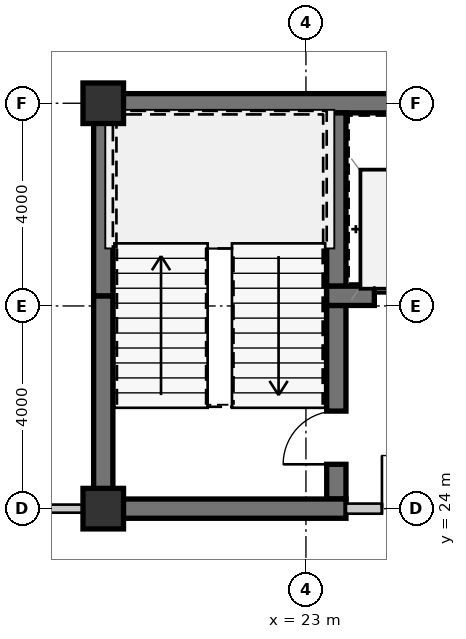
"""IFC4 building model, lengths in metres.
Left out: names, types, materials, properties, quantities, classifications, styles, units other than length and angle.
Written with IfcOpenShell. Run it as: python <this file> out.ifc"""

import sys

from ifc_helpers import new_model, si_unit, direction, frame, frame_2d, origin, origin_2d, place, context, subcontext, project, spatial, rectangle, extrude, source, transform, mapped, element, fill, save


model = new_model("IFC4")
c1 = context("Model", 3, precision=1e-05, world=origin(), true_north=direction((0.0, 1.0)))
c2 = subcontext(c1, "Body", "Model", "MODEL_VIEW")
j1 = project(units=[si_unit("LENGTHUNIT", "METRE"), si_unit("PLANEANGLEUNIT", "RADIAN")], contexts=[c1])
p1 = place(None, origin())
s1 = spatial("IfcSite", under=j1, at=p1, CompositionType="ELEMENT")
p2 = place(p1, origin())
s2 = spatial("IfcBuilding", under=s1, at=p2, CompositionType="ELEMENT")
p3 = place(p2, frame((0.0, 0.0, 19.95)))
s3 = spatial("IfcBuildingStorey", under=s2, at=p3, CompositionType="ELEMENT", Elevation=19.95)
m1 = source(origin(), c2, "Body", "SweptSolid", [
    extrude(rectangle(XDim=0.8, YDim=0.8, at=origin_2d()), origin(), (0.0, 0.0, 1.0), 3.15),
])
for number, where, z_axis, x_axis in (
    (1, (19.0, 24.0, 0.0), (0.0, 0.0, 1.0), (1.0, 0.0, 0.0)),
    (2, (19.0, 32.0, 0.0), (0.0, 0.0, 1.0), (1.0, 0.0, 0.0)),
):
    element("IfcColumn", number, at=place(p3, frame(where, z_axis=z_axis, x_axis=x_axis)), inside=s3, PredefinedType="COLUMN", context=c2, shape_type="MappedRepresentation", body=[
        mapped(m1, transform((0.0, 0.0, 0.0), scale=1.0)),
    ])
m2 = source(origin(), c2, "Body", "SweptSolid", [
    extrude(rectangle(XDim=9.19, YDim=0.38, at=frame_2d((4.595, 0.0))), origin(), (0.0, 0.0, 1.0), 2.93),
])
p4 = place(p3, frame((18.81, 32.0, 0.0), z_axis=(0.0, 0.0, 1.0), x_axis=(1.0, 0.0, 0.0)))
e3 = element("IfcWall", 3, at=p4, inside=s3, PredefinedType="SHEAR", context=c2, shape_type="MappedRepresentation", body=[
    mapped(m2, transform((0.0, 0.0, 0.0), scale=1.0)),
])
m3 = source(origin(), c2, "Body", "SweptSolid", [
    extrude(rectangle(XDim=4.01, YDim=0.38, at=frame_2d((2.005, 0.0))), origin(), (0.0, 0.0, 1.0), 2.93),
])
p5 = place(p3, frame((19.0, 24.19, 0.0), z_axis=(0.0, 0.0, 1.0), x_axis=(0.0, 1.0, 0.0)))
e4 = element("IfcWall", 4, at=p5, inside=s3, PredefinedType="SHEAR", context=c2, shape_type="MappedRepresentation", body=[
    mapped(m3, transform((0.0, 0.0, 0.0), scale=1.0)),
])
m4 = source(origin(), c2, "Body", "SweptSolid", [
    extrude(rectangle(XDim=3.61, YDim=0.38, at=frame_2d((1.805, 0.0))), origin(), (0.0, 0.0, 1.0), 2.93),
])
p6 = place(p3, frame((19.0, 28.2, 0.0), z_axis=(0.0, 0.0, 1.0), x_axis=(0.0, 1.0, 0.0)))
e5 = element("IfcWall", 5, at=p6, inside=s3, PredefinedType="SHEAR", context=c2, shape_type="MappedRepresentation", body=[
    mapped(m4, transform((0.0, 0.0, 0.0), scale=1.0)),
])
m5 = source(origin(), c2, "Body", "SweptSolid", [
    extrude(rectangle(XDim=3.42, YDim=0.38, at=frame_2d((1.71, 0.0))), origin(), (0.0, 0.0, 1.0), 2.93),
])
p7 = place(p3, frame((23.6, 28.39, 0.0), z_axis=(0.0, 0.0, 1.0), x_axis=(0.0, 1.0, 0.0)))
e6 = element("IfcWall", 6, at=p7, inside=s3, PredefinedType="SHEAR", context=c2, shape_type="MappedRepresentation", body=[
    mapped(m5, transform((0.0, 0.0, 0.0), scale=1.0)),
])
m6 = source(origin(), c2, "Body", "SweptSolid", [
    extrude(rectangle(XDim=3.82, YDim=0.38, at=frame_2d((1.91, 0.0))), origin(), (0.0, 0.0, 1.0), 2.93),
])
p8 = place(p3, frame((23.6, 24.19, 0.0), z_axis=(0.0, 0.0, 1.0), x_axis=(0.0, 1.0, 0.0)))
e7 = element("IfcWall", 7, at=p8, inside=s3, PredefinedType="SHEAR", context=c2, shape_type="MappedRepresentation", body=[
    mapped(m6, transform((0.0, 0.0, 0.0), scale=1.0)),
])
m7 = source(origin(), c2, "Body", "SweptSolid", [
    extrude(rectangle(XDim=1.05, YDim=2.1, at=frame_2d((0.525, 1.05))), frame((0.0, 0.2, 0.0), z_axis=(0.0, -1.0, 0.0), x_axis=(1.0, 0.0, 0.0)), (0.0, 0.0, 1.0), 0.4),
])
p9 = place(p8, frame((0.685, 0.0, 0.0)))
e8 = element("IfcOpeningElement", 8, at=p9, cuts=e7, PredefinedType="OPENING", context=c2, shape_type="MappedRepresentation", body=[
    mapped(m7, transform((0.0, 0.0, 0.0), scale=1.0)),
])
m8 = source(origin(), c2, "Body", "SweptSolid", [
    extrude(rectangle(XDim=4.98, YDim=0.38, at=frame_2d((2.49, 0.0))), origin(), (0.0, 0.0, 1.0), 2.93),
])
p10 = place(p3, frame((18.81, 24.0, 0.0), z_axis=(0.0, 0.0, 1.0), x_axis=(1.0, 0.0, 0.0)))
e9 = element("IfcWall", 9, at=p10, inside=s3, PredefinedType="SHEAR", context=c2, shape_type="MappedRepresentation", body=[
    mapped(m8, transform((0.0, 0.0, 0.0), scale=1.0)),
])
m9 = source(origin(), c2, "Body", "SweptSolid", [
    extrude(rectangle(XDim=2.98, YDim=0.38, at=frame_2d((1.49, 0.0))), origin(), (0.0, 0.0, 1.0), 2.93),
])
p11 = place(p3, frame((23.41, 28.2, 0.0), z_axis=(0.0, 0.0, 1.0), x_axis=(1.0, 0.0, 0.0)))
e10 = element("IfcWall", 10, at=p11, inside=s3, PredefinedType="SHEAR", context=c2, shape_type="MappedRepresentation", body=[
    mapped(m9, transform((0.0, 0.0, 0.0), scale=1.0)),
])
m10 = source(origin(), c2, "Body", "SweptSolid", [
    extrude(rectangle(XDim=1.1, YDim=2.15, at=frame_2d((0.55, 1.075))), frame((0.0, 0.2, 0.0), z_axis=(0.0, -1.0, 0.0), x_axis=(1.0, 0.0, 0.0)), (0.0, 0.0, 1.0), 0.4),
])
p12 = place(p11, frame((0.94, 0.0, 0.0)))
e11 = element("IfcOpeningElement", 11, at=p12, cuts=e10, PredefinedType="OPENING", context=c2, shape_type="MappedRepresentation", body=[
    mapped(m10, transform((0.0, 0.0, 0.0), scale=1.0)),
])
m11 = source(origin(), c2, "Body", "SweptSolid", [
    extrude(rectangle(XDim=2.66, YDim=0.2, at=frame_2d((1.33, 0.0))), origin(), (0.0, 0.0, 1.0), 2.47),
])
p13 = place(p3, frame((23.79, 24.0, 0.0), z_axis=(0.0, 0.0, 1.0), x_axis=(1.0, 0.0, 0.0)))
e12 = element("IfcWall", 12, at=p13, inside=s3, PredefinedType="SOLIDWALL", context=c2, shape_type="MappedRepresentation", body=[
    mapped(m11, transform((0.0, 0.0, 0.0), scale=1.0)),
])
m12 = source(origin(), c2, "Body", "SweptSolid", [
    extrude(rectangle(XDim=1.05, YDim=2.1, at=frame_2d((0.525, 1.05))), frame((0.0, 0.11, 0.0), z_axis=(0.0, -1.0, 0.0), x_axis=(1.0, 0.0, 0.0)), (0.0, 0.0, 1.0), 0.22),
])
p14 = place(p13, frame((0.71, 0.0, 0.0)))
e13 = element("IfcOpeningElement", 13, at=p14, cuts=e12, PredefinedType="OPENING", context=c2, shape_type="MappedRepresentation", body=[
    mapped(m12, transform((0.0, 0.0, 0.0), scale=1.0)),
])
m13 = source(origin(), c2, "Body", "SweptSolid", [
    extrude(rectangle(XDim=4.13, YDim=0.16, at=frame_2d((2.065, 0.0))), origin(), (0.0, 0.0, 1.0), 2.93),
])
p15 = place(p3, frame((14.68, 24.0, 0.0), z_axis=(0.0, 0.0, 1.0), x_axis=(1.0, 0.0, 0.0)))
e14 = element("IfcWall", 14, at=p15, inside=s3, PredefinedType="PARTITIONING", context=c2, shape_type="MappedRepresentation", body=[
    mapped(m13, transform((0.0, 0.0, 0.0), scale=1.0)),
])
m14 = source(origin(), c2, "Body", "SweptSolid", [
    extrude(rectangle(XDim=0.92, YDim=2.1, at=frame_2d((0.46, 1.05))), frame((0.0, 0.09, 0.0), z_axis=(0.0, -1.0, 0.0), x_axis=(1.0, 0.0, 0.0)), (0.0, 0.0, 1.0), 0.18),
])
p16 = place(p15, frame((1.69, 0.0, 0.0)))
e15 = element("IfcOpeningElement", 15, at=p16, cuts=e14, PredefinedType="OPENING", context=c2, shape_type="MappedRepresentation", body=[
    mapped(m14, transform((0.0, 0.0, 0.0), scale=1.0)),
])
m15 = source(origin(), c2, "Body", "SweptSolid", [
    extrude(rectangle(XDim=1.05, YDim=2.1, at=frame_2d((0.525, 1.05))), frame((0.0, 0.025, 0.0), z_axis=(0.0, -1.0, 0.0), x_axis=(1.0, 0.0, 0.0)), (0.0, 0.0, 1.0), 0.05),
])
p17 = place(p9, origin())
e16 = element("IfcDoor", 16, at=p17, inside=s3, OperationType="SINGLE_SWING_LEFT", PredefinedType="DOOR", context=c2, shape_type="MappedRepresentation", body=[
    mapped(m15, transform((0.0, 0.0, 0.0), scale=1.0)),
])
fill(e8, e16)
m16 = source(origin(), c2, "Body", "SweptSolid", [
    extrude(rectangle(XDim=1.1, YDim=2.15, at=frame_2d((0.55, 1.075))), frame((0.0, 0.025, 0.0), z_axis=(0.0, -1.0, 0.0), x_axis=(1.0, 0.0, 0.0)), (0.0, 0.0, 1.0), 0.05),
])
p18 = place(p12, origin())
e17 = element("IfcDoor", 17, at=p18, inside=s3, OperationType="SLIDING_TO_LEFT", PredefinedType="DOOR", context=c2, shape_type="MappedRepresentation", body=[
    mapped(m16, transform((0.0, 0.0, 0.0), scale=1.0)),
])
fill(e11, e17)
p19 = place(p14, origin())
e18 = element("IfcDoor", 18, at=p19, inside=s3, OperationType="SINGLE_SWING_LEFT", PredefinedType="DOOR", context=c2, shape_type="MappedRepresentation", body=[
    mapped(m15, transform((0.0, 0.0, 0.0), scale=1.0)),
])
fill(e13, e18)
save(model, sys.argv[1])
